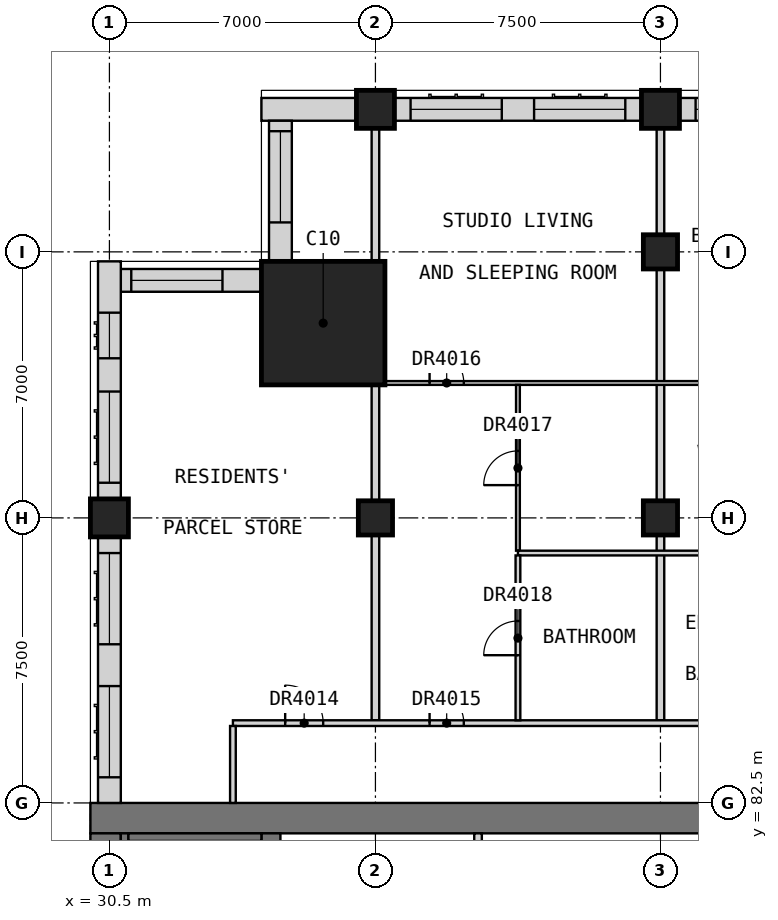
"""IFC4 building model, lengths in metres.
Left out: names, types, materials, properties, quantities, classifications, styles, units other than length and angle.
Written with IfcOpenShell. Run it as: python <this file> out.ifc"""

import sys

from ifc_helpers import new_model, si_unit, direction, frame, frame_2d, origin, origin_2d, place, context, subcontext, project, spatial, rectangle, extrude, element, fill, save


model = new_model("IFC4")
c1 = context("Model", 3, precision=1e-05, world=origin(), true_north=direction((0.0, 1.0)))
c2 = subcontext(c1, "Body", "Model", "MODEL_VIEW")
j1 = project(units=[si_unit("LENGTHUNIT", "METRE"), si_unit("PLANEANGLEUNIT", "RADIAN")], contexts=[c1])
p1 = place(None, origin())
s1 = spatial("IfcSite", under=j1, at=p1, CompositionType="ELEMENT")
p2 = place(p1, origin())
s2 = spatial("IfcBuilding", under=s1, at=p2, CompositionType="ELEMENT")
p3 = place(p2, frame((0.0, 0.0, 189.7)))
s3 = spatial("IfcBuildingStorey", under=s2, at=p3, CompositionType="ELEMENT", Elevation=189.7)
for number, where, z_axis, x_axis in (
    (1, (37.5, 100.75, 0.0), (0.0, 0.0, 1.0), (1.0, 0.0, 0.0)),
    (2, (45.0, 100.75, 0.0), (0.0, 0.0, 1.0), (1.0, 0.0, 0.0)),
    (3, (30.5, 90.0, 0.0), (0.0, 0.0, 1.0), (1.0, 0.0, 0.0)),
):
    element("IfcColumn", number, at=place(p3, frame(where, z_axis=z_axis, x_axis=x_axis)), inside=s3, PredefinedType="COLUMN", context=c2, shape_type="SweptSolid", body=[
        extrude(rectangle(XDim=1.0, YDim=1.0, at=origin_2d()), origin(), (0.0, 0.0, 1.0), 3.5),
    ])
for number, where, z_axis, x_axis in (
    (4, (37.5, 90.0, 0.0), (0.0, 0.0, 1.0), (1.0, 0.0, 0.0)),
    (5, (45.0, 90.0, 0.0), (0.0, 0.0, 1.0), (1.0, 0.0, 0.0)),
    (6, (45.0, 97.0, 0.0), (0.0, 0.0, 1.0), (1.0, 0.0, 0.0)),
):
    element("IfcColumn", number, at=place(p3, frame(where, z_axis=z_axis, x_axis=x_axis)), inside=s3, PredefinedType="COLUMN", context=c2, shape_type="SweptSolid", body=[
        extrude(rectangle(XDim=0.9, YDim=0.9, at=origin_2d()), origin(), (0.0, 0.0, 1.0), 3.5),
    ])
p4 = place(p3, frame((36.125, 95.125, 0.0), z_axis=(0.0, 0.0, 1.0), x_axis=(1.0, 0.0, 0.0)))
e7 = element("IfcColumn", 7, at=p4, inside=s3, PredefinedType="COLUMN", context=c2, shape_type="SweptSolid", body=[
    extrude(rectangle(XDim=3.25, YDim=3.25, at=origin_2d()), origin(), (0.0, 0.0, 1.0), 3.5),
])
p5 = place(p3, frame((30.0, 82.1, 0.0), z_axis=(0.0, 0.0, 1.0), x_axis=(1.0, 0.0, 0.0)))
e8 = element("IfcWall", 8, at=p5, inside=s3, PredefinedType="SHEAR", context=c2, shape_type="SweptSolid", body=[
    extrude(rectangle(XDim=30.0, YDim=0.8, at=frame_2d((15.0, 0.0))), origin(), (0.0, 0.0, 1.0), 3.5),
])
p6 = place(p3, frame((30.4, 60.8, 0.0), z_axis=(0.0, 0.0, 1.0), x_axis=(0.0, 1.0, 0.0)))
e9 = element("IfcWall", 9, at=p6, inside=s3, PredefinedType="SHEAR", context=c2, shape_type="SweptSolid", body=[
    extrude(rectangle(XDim=20.9, YDim=0.8, at=frame_2d((10.45, 0.0))), origin(), (0.0, 0.0, 1.0), 3.5),
])
p7 = place(p3, frame((34.75, 78.3, 0.0), z_axis=(0.0, 0.0, 1.0), x_axis=(0.0, 1.0, 0.0)))
e10 = element("IfcWall", 10, at=p7, inside=s3, PredefinedType="SHEAR", context=c2, shape_type="SweptSolid", body=[
    extrude(rectangle(XDim=3.4, YDim=0.5, at=frame_2d((1.7, 0.0))), origin(), (0.0, 0.0, 1.0), 3.5),
])
p8 = place(p3, frame((52.0, 100.75, 0.0), z_axis=(0.0, 0.0, 1.0), x_axis=(-1.0, 0.0, 0.0)))
e11 = element("IfcWall", 11, at=p8, inside=s3, PredefinedType="SOLIDWALL", context=c2, shape_type="SweptSolid", body=[
    extrude(rectangle(XDim=6.5, YDim=0.6, at=frame_2d((3.25, 0.0))), origin(), (0.0, 0.0, 1.0), 2.75),
])
p9 = place(p8, frame((3.675, 0.0, 0.8)))
e12 = element("IfcOpeningElement", 12, at=p9, cuts=e11, PredefinedType="OPENING", context=c2, shape_type="SweptSolid", body=[
    extrude(rectangle(XDim=2.4, YDim=1.8, at=frame_2d((1.2, 0.9))), frame((0.0, 0.31, 0.0), z_axis=(0.0, -1.0, 0.0), x_axis=(1.0, 0.0, 0.0)), (0.0, 0.0, 1.0), 0.62),
])
p10 = place(p8, frame((0.425, 0.0, 0.8)))
e13 = element("IfcOpeningElement", 13, at=p10, cuts=e11, PredefinedType="OPENING", context=c2, shape_type="SweptSolid", body=[
    extrude(rectangle(XDim=2.4, YDim=1.8, at=frame_2d((1.2, 0.9))), frame((0.0, 0.31, 0.0), z_axis=(0.0, -1.0, 0.0), x_axis=(1.0, 0.0, 0.0)), (0.0, 0.0, 1.0), 0.62),
])
p11 = place(p3, frame((44.5, 100.75, 0.0), z_axis=(0.0, 0.0, 1.0), x_axis=(-1.0, 0.0, 0.0)))
e14 = element("IfcWall", 14, at=p11, inside=s3, PredefinedType="SOLIDWALL", context=c2, shape_type="SweptSolid", body=[
    extrude(rectangle(XDim=6.5, YDim=0.6, at=frame_2d((3.25, 0.0))), origin(), (0.0, 0.0, 1.0), 2.75),
])
p12 = place(p11, frame((3.675, 0.0, 0.8)))
e15 = element("IfcOpeningElement", 15, at=p12, cuts=e14, PredefinedType="OPENING", context=c2, shape_type="SweptSolid", body=[
    extrude(rectangle(XDim=2.4, YDim=1.8, at=frame_2d((1.2, 0.9))), frame((0.0, 0.31, 0.0), z_axis=(0.0, -1.0, 0.0), x_axis=(1.0, 0.0, 0.0)), (0.0, 0.0, 1.0), 0.62),
])
p13 = place(p11, frame((0.425, 0.0, 0.8)))
e16 = element("IfcOpeningElement", 16, at=p13, cuts=e14, PredefinedType="OPENING", context=c2, shape_type="SweptSolid", body=[
    extrude(rectangle(XDim=2.4, YDim=1.8, at=frame_2d((1.2, 0.9))), frame((0.0, 0.31, 0.0), z_axis=(0.0, -1.0, 0.0), x_axis=(1.0, 0.0, 0.0)), (0.0, 0.0, 1.0), 0.62),
])
p14 = place(p3, frame((37.0, 100.75, 0.0), z_axis=(0.0, 0.0, 1.0), x_axis=(-1.0, 0.0, 0.0)))
e17 = element("IfcWall", 17, at=p14, inside=s3, PredefinedType="SOLIDWALL", context=c2, shape_type="SweptSolid", body=[
    extrude(rectangle(XDim=2.5, YDim=0.6, at=frame_2d((1.25, 0.0))), origin(), (0.0, 0.0, 1.0), 3.25),
])
p15 = place(p3, frame((35.0, 100.45, 0.0), z_axis=(0.0, 0.0, 1.0), x_axis=(0.0, -1.0, 0.0)))
e18 = element("IfcWall", 18, at=p15, inside=s3, PredefinedType="SOLIDWALL", context=c2, shape_type="SweptSolid", body=[
    extrude(rectangle(XDim=3.7, YDim=0.6, at=frame_2d((1.85, 0.0))), origin(), (0.0, 0.0, 1.0), 3.25),
])
p16 = place(p15, frame((0.275, 0.0, 0.8)))
e19 = element("IfcOpeningElement", 19, at=p16, cuts=e18, PredefinedType="OPENING", context=c2, shape_type="SweptSolid", body=[
    extrude(rectangle(XDim=2.4, YDim=1.8, at=frame_2d((1.2, 0.9))), frame((0.0, 0.31, 0.0), z_axis=(0.0, -1.0, 0.0), x_axis=(1.0, 0.0, 0.0)), (0.0, 0.0, 1.0), 0.62),
])
p17 = place(p3, frame((34.5, 96.25, 0.0), z_axis=(0.0, 0.0, 1.0), x_axis=(-1.0, 0.0, 0.0)))
e20 = element("IfcWall", 20, at=p17, inside=s3, PredefinedType="SOLIDWALL", context=c2, shape_type="SweptSolid", body=[
    extrude(rectangle(XDim=3.7, YDim=0.6, at=frame_2d((1.85, 0.0))), origin(), (0.0, 0.0, 1.0), 3.25),
])
p18 = place(p17, frame((1.025, 0.0, 0.8)))
e21 = element("IfcOpeningElement", 21, at=p18, cuts=e20, PredefinedType="OPENING", context=c2, shape_type="SweptSolid", body=[
    extrude(rectangle(XDim=2.4, YDim=1.8, at=frame_2d((1.2, 0.9))), frame((0.0, 0.31, 0.0), z_axis=(0.0, -1.0, 0.0), x_axis=(1.0, 0.0, 0.0)), (0.0, 0.0, 1.0), 0.62),
])
p19 = place(p3, frame((30.5, 96.75, 0.0), z_axis=(0.0, 0.0, 1.0), x_axis=(0.0, -1.0, 0.0)))
e22 = element("IfcWall", 22, at=p19, inside=s3, PredefinedType="SOLIDWALL", context=c2, shape_type="SweptSolid", body=[
    extrude(rectangle(XDim=6.25, YDim=0.6, at=frame_2d((3.125, 0.0))), origin(), (0.0, 0.0, 1.0), 2.75),
])
p20 = place(p19, frame((3.425, 0.0, 0.8)))
e23 = element("IfcOpeningElement", 23, at=p20, cuts=e22, PredefinedType="OPENING", context=c2, shape_type="SweptSolid", body=[
    extrude(rectangle(XDim=2.4, YDim=1.8, at=frame_2d((1.2, 0.9))), frame((0.0, 0.31, 0.0), z_axis=(0.0, -1.0, 0.0), x_axis=(1.0, 0.0, 0.0)), (0.0, 0.0, 1.0), 0.62),
])
p21 = place(p19, frame((1.35, 0.0, 0.8)))
e24 = element("IfcOpeningElement", 24, at=p21, cuts=e22, PredefinedType="OPENING", context=c2, shape_type="SweptSolid", body=[
    extrude(rectangle(XDim=1.2, YDim=1.8, at=frame_2d((0.6, 0.9))), frame((0.0, 0.31, 0.0), z_axis=(0.0, -1.0, 0.0), x_axis=(1.0, 0.0, 0.0)), (0.0, 0.0, 1.0), 0.62),
])
p22 = place(p3, frame((30.5, 89.5, 0.0), z_axis=(0.0, 0.0, 1.0), x_axis=(0.0, -1.0, 0.0)))
e25 = element("IfcWall", 25, at=p22, inside=s3, PredefinedType="SOLIDWALL", context=c2, shape_type="SweptSolid", body=[
    extrude(rectangle(XDim=7.0, YDim=0.6, at=frame_2d((3.5, 0.0))), origin(), (0.0, 0.0, 1.0), 3.25),
])
p23 = place(p22, frame((3.925, 0.0, 0.8)))
e26 = element("IfcOpeningElement", 26, at=p23, cuts=e25, PredefinedType="OPENING", context=c2, shape_type="SweptSolid", body=[
    extrude(rectangle(XDim=2.4, YDim=1.8, at=frame_2d((1.2, 0.9))), frame((0.0, 0.31, 0.0), z_axis=(0.0, -1.0, 0.0), x_axis=(1.0, 0.0, 0.0)), (0.0, 0.0, 1.0), 0.62),
])
p24 = place(p22, frame((0.425, 0.0, 0.8)))
e27 = element("IfcOpeningElement", 27, at=p24, cuts=e25, PredefinedType="OPENING", context=c2, shape_type="SweptSolid", body=[
    extrude(rectangle(XDim=2.4, YDim=1.8, at=frame_2d((1.2, 0.9))), frame((0.0, 0.31, 0.0), z_axis=(0.0, -1.0, 0.0), x_axis=(1.0, 0.0, 0.0)), (0.0, 0.0, 1.0), 0.62),
])
p25 = place(p3, frame((40.2, 78.5, 0.0), z_axis=(0.0, 0.0, 1.0), x_axis=(0.0, 1.0, 0.0)))
e28 = element("IfcWall", 28, at=p25, inside=s3, PredefinedType="SOLIDWALL", context=c2, shape_type="SweptSolid", body=[
    extrude(rectangle(XDim=3.2, YDim=0.2, at=frame_2d((1.6, 0.0))), origin(), (0.0, 0.0, 1.0), 3.5),
])
p26 = place(p3, frame((30.9, 60.8, 0.0), z_axis=(0.0, 0.0, 1.0), x_axis=(0.0, 1.0, 0.0)))
e29 = element("IfcWall", 29, at=p26, inside=s3, PredefinedType="SOLIDWALL", context=c2, shape_type="SweptSolid", body=[
    extrude(rectangle(XDim=20.9, YDim=0.2, at=frame_2d((10.45, 0.0))), origin(), (0.0, 0.0, 1.0), 3.25),
])
p27 = place(p3, frame((31.0, 81.6, 0.0), z_axis=(0.0, 0.0, 1.0), x_axis=(1.0, 0.0, 0.0)))
e30 = element("IfcWall", 30, at=p27, inside=s3, PredefinedType="SOLIDWALL", context=c2, shape_type="SweptSolid", body=[
    extrude(rectangle(XDim=3.5, YDim=0.2, at=frame_2d((1.75, 0.0))), origin(), (0.0, 0.0, 1.0), 3.25),
])
p28 = place(p3, frame((37.5, 84.675, 0.0), z_axis=(0.0, 0.0, 1.0), x_axis=(0.0, 1.0, 0.0)))
e31 = element("IfcWall", 31, at=p28, inside=s3, PredefinedType="PARTITIONING", context=c2, shape_type="SweptSolid", body=[
    extrude(rectangle(XDim=16.575, YDim=0.2, at=frame_2d((8.288, 0.0))), origin(), (0.0, 0.0, 1.0), 2.75),
])
p29 = place(p3, frame((45.0, 84.675, 0.0), z_axis=(0.0, 0.0, 1.0), x_axis=(0.0, 1.0, 0.0)))
e32 = element("IfcWall", 32, at=p29, inside=s3, PredefinedType="PARTITIONING", context=c2, shape_type="SweptSolid", body=[
    extrude(rectangle(XDim=16.575, YDim=0.2, at=frame_2d((8.288, 0.0))), origin(), (0.0, 0.0, 1.0), 3.25),
])
p30 = place(p3, frame((33.75, 84.6, 0.0), z_axis=(0.0, 0.0, 1.0), x_axis=(1.0, 0.0, 0.0)))
e33 = element("IfcWall", 33, at=p30, inside=s3, PredefinedType="PARTITIONING", context=c2, shape_type="SweptSolid", body=[
    extrude(rectangle(XDim=28.35, YDim=0.15, at=frame_2d((14.175, 0.0))), origin(), (0.0, 0.0, 1.0), 3.25),
])
p31 = place(p30, frame((1.375, 0.0, 0.0)))
e34 = element("IfcOpeningElement", 34, at=p31, cuts=e33, PredefinedType="OPENING", context=c2, shape_type="SweptSolid", body=[
    extrude(rectangle(XDim=1.0, YDim=2.1, at=frame_2d((0.5, 1.05))), frame((0.0, 0.085, 0.0), z_axis=(0.0, -1.0, 0.0), x_axis=(1.0, 0.0, 0.0)), (0.0, 0.0, 1.0), 0.17),
])
p32 = place(p30, frame((5.175, 0.0, 0.0)))
e35 = element("IfcOpeningElement", 35, at=p32, cuts=e33, PredefinedType="OPENING", context=c2, shape_type="SweptSolid", body=[
    extrude(rectangle(XDim=0.9, YDim=2.1, at=frame_2d((0.45, 1.05))), frame((0.0, 0.085, 0.0), z_axis=(0.0, -1.0, 0.0), x_axis=(1.0, 0.0, 0.0)), (0.0, 0.0, 1.0), 0.17),
])
p33 = place(p30, frame((16.425, 0.0, 0.0)))
e36 = element("IfcOpeningElement", 36, at=p33, cuts=e33, PredefinedType="OPENING", context=c2, shape_type="SweptSolid", body=[
    extrude(rectangle(XDim=0.9, YDim=2.1, at=frame_2d((0.45, 1.05))), frame((0.0, 0.085, 0.0), z_axis=(0.0, -1.0, 0.0), x_axis=(1.0, 0.0, 0.0)), (0.0, 0.0, 1.0), 0.17),
])
p34 = place(p3, frame((33.75, 82.5, 0.0), z_axis=(0.0, 0.0, 1.0), x_axis=(0.0, 1.0, 0.0)))
e37 = element("IfcWall", 37, at=p34, inside=s3, PredefinedType="PARTITIONING", context=c2, shape_type="SweptSolid", body=[
    extrude(rectangle(XDim=2.025, YDim=0.15, at=frame_2d((1.012, 0.0))), origin(), (0.0, 0.0, 1.0), 3.25),
])
p35 = place(p3, frame((37.6, 93.55, 0.0), z_axis=(0.0, 0.0, 1.0), x_axis=(1.0, 0.0, 0.0)))
e38 = element("IfcWall", 38, at=p35, inside=s3, PredefinedType="PARTITIONING", context=c2, shape_type="SweptSolid", body=[
    extrude(rectangle(XDim=22.3, YDim=0.1, at=frame_2d((11.15, 0.0))), origin(), (0.0, 0.0, 1.0), 3.25),
])
p36 = place(p35, frame((1.325, 0.0, 0.0)))
e39 = element("IfcOpeningElement", 39, at=p36, cuts=e38, PredefinedType="OPENING", context=c2, shape_type="SweptSolid", body=[
    extrude(rectangle(XDim=0.9, YDim=2.1, at=frame_2d((0.45, 1.05))), frame((0.0, 0.06, 0.0), z_axis=(0.0, -1.0, 0.0), x_axis=(1.0, 0.0, 0.0)), (0.0, 0.0, 1.0), 0.12),
])
p37 = place(p35, frame((8.825, 0.0, 0.0)))
e40 = element("IfcOpeningElement", 40, at=p37, cuts=e38, PredefinedType="OPENING", context=c2, shape_type="SweptSolid", body=[
    extrude(rectangle(XDim=0.9, YDim=2.1, at=frame_2d((0.45, 1.05))), frame((0.0, 0.06, 0.0), z_axis=(0.0, -1.0, 0.0), x_axis=(1.0, 0.0, 0.0)), (0.0, 0.0, 1.0), 0.12),
])
p38 = place(p35, frame((12.575, 0.0, 0.0)))
e41 = element("IfcOpeningElement", 41, at=p38, cuts=e38, PredefinedType="OPENING", context=c2, shape_type="SweptSolid", body=[
    extrude(rectangle(XDim=0.9, YDim=2.1, at=frame_2d((0.45, 1.05))), frame((0.0, 0.06, 0.0), z_axis=(0.0, -1.0, 0.0), x_axis=(1.0, 0.0, 0.0)), (0.0, 0.0, 1.0), 0.12),
])
p39 = place(p35, frame((20.075, 0.0, 0.0)))
e42 = element("IfcOpeningElement", 42, at=p39, cuts=e38, PredefinedType="OPENING", context=c2, shape_type="SweptSolid", body=[
    extrude(rectangle(XDim=0.9, YDim=2.1, at=frame_2d((0.45, 1.05))), frame((0.0, 0.06, 0.0), z_axis=(0.0, -1.0, 0.0), x_axis=(1.0, 0.0, 0.0)), (0.0, 0.0, 1.0), 0.12),
])
p40 = place(p3, frame((41.25, 89.137, 0.0), z_axis=(0.0, 0.0, 1.0), x_axis=(0.0, 1.0, 0.0)))
e43 = element("IfcWall", 43, at=p40, inside=s3, PredefinedType="PARTITIONING", context=c2, shape_type="SweptSolid", body=[
    extrude(rectangle(XDim=4.363, YDim=0.1, at=frame_2d((2.181, 0.0))), origin(), (0.0, 0.0, 1.0), 3.25),
])
p41 = place(p40, frame((1.725, 0.0, 0.0)))
e44 = element("IfcOpeningElement", 44, at=p41, cuts=e43, PredefinedType="OPENING", context=c2, shape_type="SweptSolid", body=[
    extrude(rectangle(XDim=0.9, YDim=2.1, at=frame_2d((0.45, 1.05))), frame((0.0, 0.06, 0.0), z_axis=(0.0, -1.0, 0.0), x_axis=(1.0, 0.0, 0.0)), (0.0, 0.0, 1.0), 0.12),
])
p42 = place(p3, frame((41.25, 89.075, 0.0), z_axis=(0.0, 0.0, 1.0), x_axis=(1.0, 0.0, 0.0)))
e45 = element("IfcWall", 45, at=p42, inside=s3, PredefinedType="PARTITIONING", context=c2, shape_type="SweptSolid", body=[
    extrude(rectangle(XDim=7.5, YDim=0.125, at=frame_2d((3.75, 0.0))), origin(), (0.0, 0.0, 1.0), 3.25),
])
p43 = place(p42, frame((5.175, 0.0, 0.0)))
e46 = element("IfcOpeningElement", 46, at=p43, cuts=e45, PredefinedType="OPENING", context=c2, shape_type="SweptSolid", body=[
    extrude(rectangle(XDim=0.9, YDim=2.1, at=frame_2d((0.45, 1.05))), frame((0.0, 0.073, 0.0), z_axis=(0.0, -1.0, 0.0), x_axis=(1.0, 0.0, 0.0)), (0.0, 0.0, 1.0), 0.145),
])
p44 = place(p3, frame((41.25, 84.675, 0.0), z_axis=(0.0, 0.0, 1.0), x_axis=(0.0, 1.0, 0.0)))
e47 = element("IfcWall", 47, at=p44, inside=s3, PredefinedType="PARTITIONING", context=c2, shape_type="SweptSolid", body=[
    extrude(rectangle(XDim=4.337, YDim=0.125, at=frame_2d((2.169, 0.0))), origin(), (0.0, 0.0, 1.0), 3.25),
])
p45 = place(p44, frame((1.712, 0.0, 0.0)))
e48 = element("IfcOpeningElement", 48, at=p45, cuts=e47, PredefinedType="OPENING", context=c2, shape_type="SweptSolid", body=[
    extrude(rectangle(XDim=0.9, YDim=2.1, at=frame_2d((0.45, 1.05))), frame((0.0, 0.073, 0.0), z_axis=(0.0, -1.0, 0.0), x_axis=(1.0, 0.0, 0.0)), (0.0, 0.0, 1.0), 0.145),
])
p46 = place(p9, origin())
e49 = element("IfcWindow", 49, at=p46, inside=s3, PartitioningType="SINGLE_PANEL", PredefinedType="WINDOW", context=c2, shape_type="SweptSolid", body=[
    extrude(rectangle(XDim=2.4, YDim=1.8, at=frame_2d((1.2, 0.9))), frame((0.0, -0.07, 0.0), z_axis=(0.0, -1.0, 0.0), x_axis=(1.0, 0.0, 0.0)), (0.0, 0.0, 1.0), 0.06),
])
fill(e12, e49)
p47 = place(p12, origin())
e50 = element("IfcWindow", 50, at=p47, inside=s3, PartitioningType="SINGLE_PANEL", PredefinedType="WINDOW", context=c2, shape_type="SweptSolid", body=[
    extrude(rectangle(XDim=2.4, YDim=1.8, at=frame_2d((1.2, 0.9))), frame((0.0, -0.07, 0.0), z_axis=(0.0, -1.0, 0.0), x_axis=(1.0, 0.0, 0.0)), (0.0, 0.0, 1.0), 0.06),
])
fill(e15, e50)
p48 = place(p13, origin())
e51 = element("IfcWindow", 51, at=p48, inside=s3, PartitioningType="SINGLE_PANEL", PredefinedType="WINDOW", context=c2, shape_type="SweptSolid", body=[
    extrude(rectangle(XDim=2.4, YDim=1.8, at=frame_2d((1.2, 0.9))), frame((0.0, -0.07, 0.0), z_axis=(0.0, -1.0, 0.0), x_axis=(1.0, 0.0, 0.0)), (0.0, 0.0, 1.0), 0.06),
])
fill(e16, e51)
p49 = place(p16, origin())
e52 = element("IfcWindow", 52, at=p49, inside=s3, PartitioningType="SINGLE_PANEL", PredefinedType="WINDOW", context=c2, shape_type="SweptSolid", body=[
    extrude(rectangle(XDim=2.4, YDim=1.8, at=frame_2d((1.2, 0.9))), frame((0.0, -0.07, 0.0), z_axis=(0.0, -1.0, 0.0), x_axis=(1.0, 0.0, 0.0)), (0.0, 0.0, 1.0), 0.06),
])
fill(e19, e52)
p50 = place(p18, origin())
e53 = element("IfcWindow", 53, at=p50, inside=s3, PartitioningType="SINGLE_PANEL", PredefinedType="WINDOW", context=c2, shape_type="SweptSolid", body=[
    extrude(rectangle(XDim=2.4, YDim=1.8, at=frame_2d((1.2, 0.9))), frame((0.0, -0.07, 0.0), z_axis=(0.0, -1.0, 0.0), x_axis=(1.0, 0.0, 0.0)), (0.0, 0.0, 1.0), 0.06),
])
fill(e21, e53)
p51 = place(p20, origin())
e54 = element("IfcWindow", 54, at=p51, inside=s3, PartitioningType="SINGLE_PANEL", PredefinedType="WINDOW", context=c2, shape_type="SweptSolid", body=[
    extrude(rectangle(XDim=2.4, YDim=1.8, at=frame_2d((1.2, 0.9))), frame((0.0, -0.07, 0.0), z_axis=(0.0, -1.0, 0.0), x_axis=(1.0, 0.0, 0.0)), (0.0, 0.0, 1.0), 0.06),
])
fill(e23, e54)
p52 = place(p21, origin())
e55 = element("IfcWindow", 55, at=p52, inside=s3, PartitioningType="SINGLE_PANEL", PredefinedType="WINDOW", context=c2, shape_type="SweptSolid", body=[
    extrude(rectangle(XDim=1.2, YDim=1.8, at=frame_2d((0.6, 0.9))), frame((0.0, -0.07, 0.0), z_axis=(0.0, -1.0, 0.0), x_axis=(1.0, 0.0, 0.0)), (0.0, 0.0, 1.0), 0.06),
])
fill(e24, e55)
p53 = place(p23, origin())
e56 = element("IfcWindow", 56, at=p53, inside=s3, PartitioningType="SINGLE_PANEL", PredefinedType="WINDOW", context=c2, shape_type="SweptSolid", body=[
    extrude(rectangle(XDim=2.4, YDim=1.8, at=frame_2d((1.2, 0.9))), frame((0.0, -0.07, 0.0), z_axis=(0.0, -1.0, 0.0), x_axis=(1.0, 0.0, 0.0)), (0.0, 0.0, 1.0), 0.06),
])
fill(e26, e56)
p54 = place(p24, origin())
e57 = element("IfcWindow", 57, at=p54, inside=s3, PartitioningType="SINGLE_PANEL", PredefinedType="WINDOW", context=c2, shape_type="SweptSolid", body=[
    extrude(rectangle(XDim=2.4, YDim=1.8, at=frame_2d((1.2, 0.9))), frame((0.0, -0.07, 0.0), z_axis=(0.0, -1.0, 0.0), x_axis=(1.0, 0.0, 0.0)), (0.0, 0.0, 1.0), 0.06),
])
fill(e27, e57)
p55 = place(p31, origin())
e58 = element("IfcDoor", 58, at=p55, inside=s3, OperationType="SINGLE_SWING_LEFT", PredefinedType="DOOR", context=c2, shape_type="SweptSolid", body=[
    extrude(rectangle(XDim=1.0, YDim=2.1, at=frame_2d((0.5, 1.05))), frame((0.0, 0.025, 0.0), z_axis=(0.0, -1.0, 0.0), x_axis=(1.0, 0.0, 0.0)), (0.0, 0.0, 1.0), 0.05),
])
fill(e34, e58)
p56 = place(p32, origin())
e59 = element("IfcDoor", 59, at=p56, inside=s3, OperationType="SINGLE_SWING_LEFT", PredefinedType="DOOR", context=c2, shape_type="SweptSolid", body=[
    extrude(rectangle(XDim=0.9, YDim=2.1, at=frame_2d((0.45, 1.05))), frame((0.0, 0.025, 0.0), z_axis=(0.0, -1.0, 0.0), x_axis=(1.0, 0.0, 0.0)), (0.0, 0.0, 1.0), 0.05),
])
fill(e35, e59)
p57 = place(p36, origin())
e60 = element("IfcDoor", 60, at=p57, inside=s3, OperationType="SINGLE_SWING_RIGHT", PredefinedType="DOOR", context=c2, shape_type="SweptSolid", body=[
    extrude(rectangle(XDim=0.9, YDim=2.1, at=frame_2d((0.45, 1.05))), frame((0.0, 0.025, 0.0), z_axis=(0.0, -1.0, 0.0), x_axis=(1.0, 0.0, 0.0)), (0.0, 0.0, 1.0), 0.05),
])
fill(e39, e60)
p58 = place(p41, origin())
e61 = element("IfcDoor", 61, at=p58, inside=s3, OperationType="SINGLE_SWING_RIGHT", PredefinedType="DOOR", context=c2, shape_type="SweptSolid", body=[
    extrude(rectangle(XDim=0.9, YDim=2.1, at=frame_2d((0.45, 1.05))), frame((0.0, 0.025, 0.0), z_axis=(0.0, -1.0, 0.0), x_axis=(1.0, 0.0, 0.0)), (0.0, 0.0, 1.0), 0.05),
])
fill(e44, e61)
p59 = place(p45, origin())
e62 = element("IfcDoor", 62, at=p59, inside=s3, OperationType="SINGLE_SWING_LEFT", PredefinedType="DOOR", context=c2, shape_type="SweptSolid", body=[
    extrude(rectangle(XDim=0.9, YDim=2.1, at=frame_2d((0.45, 1.05))), frame((0.0, 0.025, 0.0), z_axis=(0.0, -1.0, 0.0), x_axis=(1.0, 0.0, 0.0)), (0.0, 0.0, 1.0), 0.05),
])
fill(e48, e62)
save(model, sys.argv[1])
